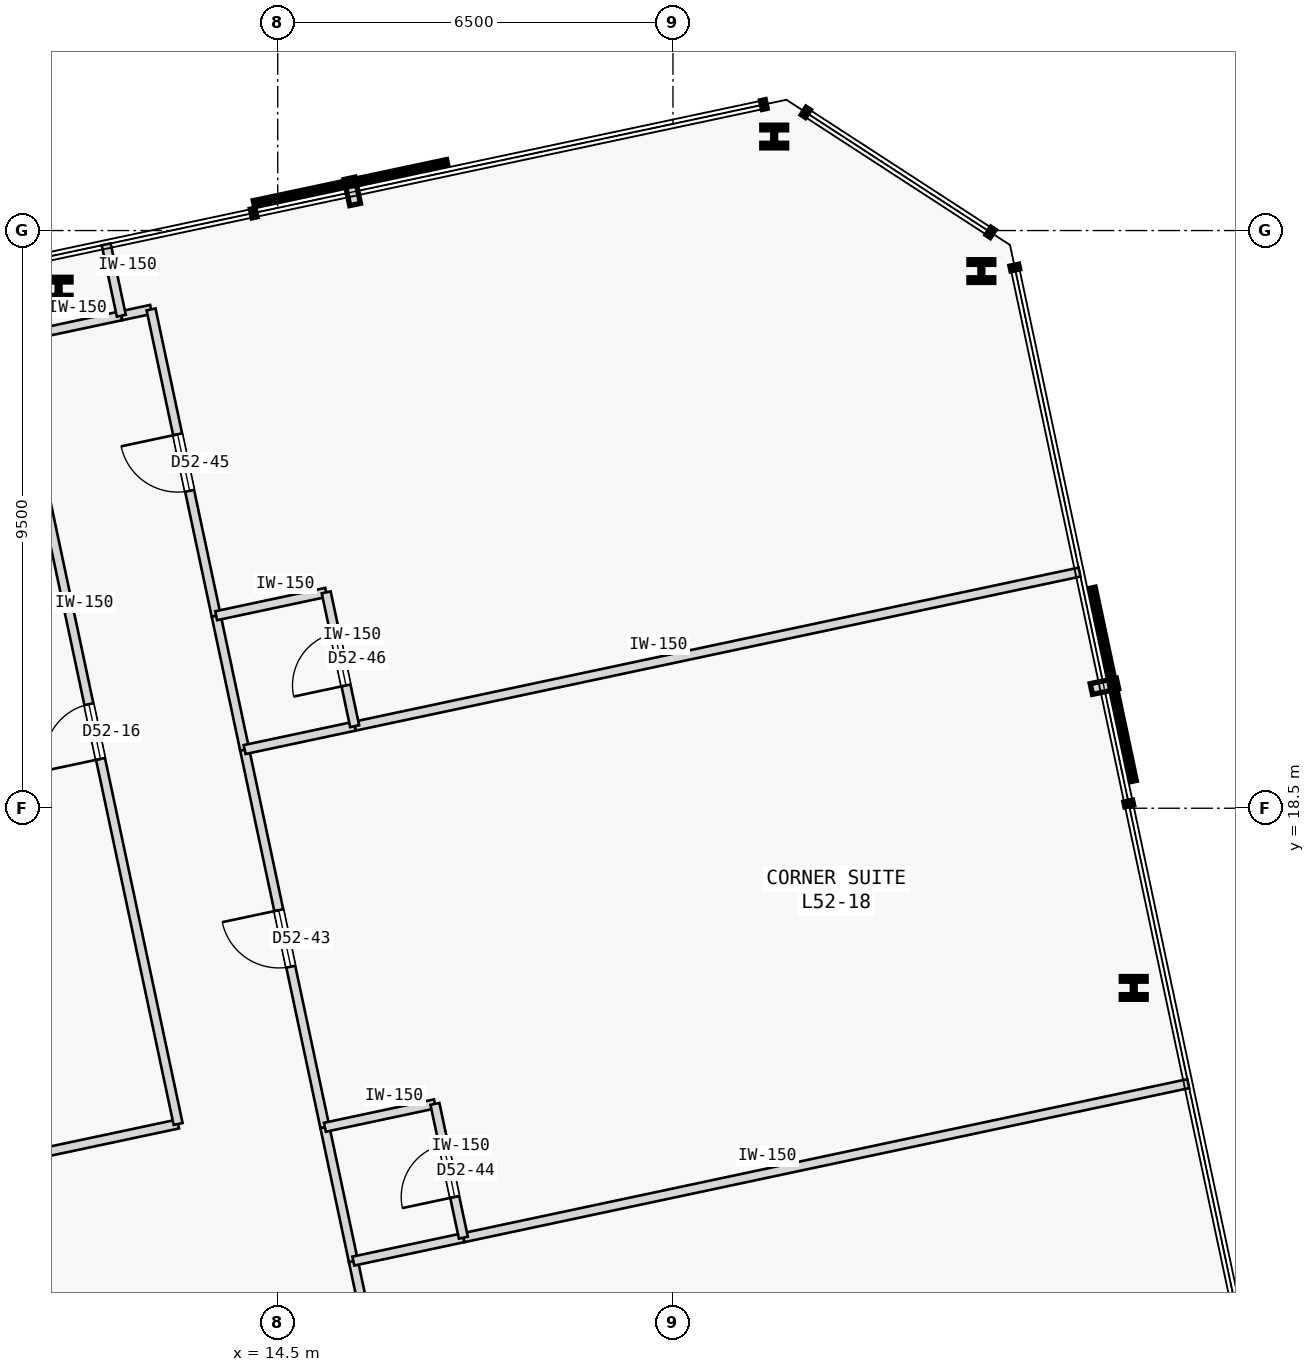
"""IFC4 building model, lengths in metres.
Left out: names, types, materials, properties, quantities, classifications, styles, units other than length and angle.
Written with IfcOpenShell. Run it as: python <this file> out.ifc"""

import sys

from ifc_helpers import new_model, si_unit, direction, frame, frame_2d, origin, origin_2d, place, context, subcontext, project, spatial, rectangle, i_section, extrude, element, fill, save


model = new_model("IFC4")
c1 = context("Model", 3, precision=1e-05, world=origin(), true_north=direction((0.0, 1.0)))
c2 = subcontext(c1, "Body", "Model", "MODEL_VIEW")
j1 = project(units=[si_unit("LENGTHUNIT", "METRE"), si_unit("PLANEANGLEUNIT", "RADIAN")], contexts=[c1])
p1 = place(None, origin())
s1 = spatial("IfcSite", under=j1, at=p1, CompositionType="ELEMENT")
p2 = place(p1, origin())
s2 = spatial("IfcBuilding", under=s1, at=p2, CompositionType="ELEMENT")
p3 = place(p2, frame((0.0, 0.0, 199.0)))
s3 = spatial("IfcBuildingStorey", under=s2, at=p3, CompositionType="ELEMENT", Elevation=199.0)
for number, where, z_axis, x_axis in (
    (1, (28.577, 15.545, 0.0), (0.0, 0.0, 1.0), (1.0, 0.0, 0.0)),
    (2, (26.071, 27.333, 0.0), (0.0, 0.0, 1.0), (1.0, 0.0, 0.0)),
    (3, (22.665, 29.546, 0.0), (0.0, 0.0, 1.0), (1.0, 0.0, 0.0)),
    (4, (10.896, 27.044, 0.0), (0.0, 0.0, 1.0), (1.0, 0.0, 0.0)),
):
    element("IfcColumn", number, at=place(p3, frame(where, z_axis=z_axis, x_axis=x_axis)), inside=s3, PredefinedType="COLUMN", context=c2, shape_type="SweptSolid", body=[
        extrude(i_section(OverallWidth=0.409, OverallDepth=0.374, WebThickness=0.048, FlangeThickness=0.077, FilletRadius=0.015, at=origin_2d()), origin(), (0.0, 0.0, 1.0), 3.4),
    ])
p4 = place(p3, frame((10.046, 12.709, 0.0), z_axis=(0.0, 0.0, 1.0), x_axis=(0.97816208355, 0.207843542851, 0.0)))
e5 = element("IfcWall", 5, at=p4, inside=s3, PredefinedType="PARTITIONING", context=c2, shape_type="SweptSolid", body=[
    extrude(rectangle(XDim=2.879, YDim=0.15, at=frame_2d((1.439, 0.0))), origin(), (0.0, 0.0, 1.0), 3.0),
])
p5 = place(p3, frame((12.862, 13.308, 0.0), z_axis=(0.0, 0.0, 1.0), x_axis=(-0.207911421929, 0.978147657888, 0.0)))
e6 = element("IfcWall", 6, at=p5, inside=s3, PredefinedType="PARTITIONING", context=c2, shape_type="SweptSolid", body=[
    extrude(rectangle(XDim=13.195, YDim=0.15, at=frame_2d((6.598, 0.0))), origin(), (0.0, 0.0, 1.0), 3.0),
])
p6 = place(p5, frame((6.137, 0.0, 0.0)))
e7 = element("IfcOpeningElement", 7, at=p6, cuts=e6, PredefinedType="OPENING", context=c2, shape_type="SweptSolid", body=[
    extrude(rectangle(XDim=0.92, YDim=2.15, at=frame_2d((0.46, 1.075))), frame((0.0, 0.085, 0.0), z_axis=(0.0, -1.0, 0.0), x_axis=(1.0, 0.0, 0.0)), (0.0, 0.0, 1.0), 0.17),
])
p7 = place(p3, frame((10.118, 26.214, 0.0), z_axis=(0.0, 0.0, 1.0), x_axis=(0.978133353907, 0.20797870558, 0.0)))
e8 = element("IfcWall", 8, at=p7, inside=s3, PredefinedType="PARTITIONING", context=c2, shape_type="SweptSolid", body=[
    extrude(rectangle(XDim=1.85, YDim=0.15, at=frame_2d((0.925, 0.0))), origin(), (0.0, 0.0, 1.0), 3.0),
])
p8 = place(p3, frame((17.064, 4.841, 0.0), z_axis=(0.0, 0.0, 1.0), x_axis=(-0.207924511115, 0.978144875608, 0.0)))
e9 = element("IfcWall", 9, at=p8, inside=s3, PredefinedType="PARTITIONING", context=c2, shape_type="SweptSolid", body=[
    extrude(rectangle(XDim=6.35, YDim=0.15, at=frame_2d((3.175, 0.0))), origin(), (0.0, 0.0, 1.0), 3.0),
])
p9 = place(p8, frame((2.7, 0.0, 0.0)))
e10 = element("IfcOpeningElement", 10, at=p9, cuts=e9, PredefinedType="OPENING", context=c2, shape_type="SweptSolid", body=[
    extrude(rectangle(XDim=0.95, YDim=2.15, at=frame_2d((0.475, 1.075))), frame((0.0, 0.085, 0.0), z_axis=(0.0, -1.0, 0.0), x_axis=(1.0, 0.0, 0.0)), (0.0, 0.0, 1.0), 0.17),
])
p10 = place(p3, frame((15.276, 13.253, 0.0), z_axis=(0.0, 0.0, 1.0), x_axis=(-0.207924511115, 0.978144875608, 0.0)))
e11 = element("IfcWall", 11, at=p10, inside=s3, PredefinedType="PARTITIONING", context=c2, shape_type="SweptSolid", body=[
    extrude(rectangle(XDim=6.35, YDim=0.15, at=frame_2d((3.175, 0.0))), origin(), (0.0, 0.0, 1.0), 3.0),
])
p11 = place(p10, frame((2.7, 0.0, 0.0)))
e12 = element("IfcOpeningElement", 12, at=p11, cuts=e11, PredefinedType="OPENING", context=c2, shape_type="SweptSolid", body=[
    extrude(rectangle(XDim=0.95, YDim=2.15, at=frame_2d((0.475, 1.075))), frame((0.0, 0.085, 0.0), z_axis=(0.0, -1.0, 0.0), x_axis=(1.0, 0.0, 0.0)), (0.0, 0.0, 1.0), 0.17),
])
p12 = place(p3, frame((15.744, 11.052, 0.0), z_axis=(0.0, 0.0, 1.0), x_axis=(-0.207891197838, 0.978151956427, 0.0)))
e13 = element("IfcWall", 13, at=p12, inside=s3, PredefinedType="PARTITIONING", context=c2, shape_type="SweptSolid", body=[
    extrude(rectangle(XDim=2.25, YDim=0.15, at=frame_2d((1.125, 0.0))), origin(), (0.0, 0.0, 1.0), 3.0),
])
p13 = place(p3, frame((11.928, 26.599, 0.0), z_axis=(0.0, 0.0, 1.0), x_axis=(0.97822210712, 0.207560856478, 0.0)))
e14 = element("IfcWall", 14, at=p13, inside=s3, PredefinedType="PARTITIONING", context=c2, shape_type="SweptSolid", body=[
    extrude(rectangle(XDim=0.5, YDim=0.15, at=frame_2d((0.25, 0.0))), origin(), (0.0, 0.0, 1.0), 3.0),
])
p14 = place(p3, frame((13.488, 21.666, 0.0), z_axis=(0.0, 0.0, 1.0), x_axis=(-0.207926226209, 0.978144511028, 0.0)))
e15 = element("IfcWall", 15, at=p14, inside=s3, PredefinedType="PARTITIONING", context=c2, shape_type="SweptSolid", body=[
    extrude(rectangle(XDim=5.15, YDim=0.15, at=frame_2d((2.575, 0.0))), origin(), (0.0, 0.0, 1.0), 3.0),
])
p15 = place(p14, frame((2.1, 0.0, 0.0)))
e16 = element("IfcOpeningElement", 16, at=p15, cuts=e15, PredefinedType="OPENING", context=c2, shape_type="SweptSolid", body=[
    extrude(rectangle(XDim=0.95, YDim=2.15, at=frame_2d((0.475, 1.075))), frame((0.0, 0.085, 0.0), z_axis=(0.0, -1.0, 0.0), x_axis=(1.0, 0.0, 0.0)), (0.0, 0.0, 1.0), 0.17),
])
p16 = place(p3, frame((13.956, 19.465, 0.0), z_axis=(0.0, 0.0, 1.0), x_axis=(-0.207891197838, 0.978151956427, 0.0)))
e17 = element("IfcWall", 17, at=p16, inside=s3, PredefinedType="PARTITIONING", context=c2, shape_type="SweptSolid", body=[
    extrude(rectangle(XDim=2.25, YDim=0.15, at=frame_2d((1.125, 0.0))), origin(), (0.0, 0.0, 1.0), 3.0),
])
p17 = place(p3, frame((11.928, 26.599, 0.0), z_axis=(0.0, 0.0, 1.0), x_axis=(-0.20795853359, 0.978137642823, 0.0)))
e18 = element("IfcWall", 18, at=p17, inside=s3, PredefinedType="PARTITIONING", context=c2, shape_type="SweptSolid", body=[
    extrude(rectangle(XDim=1.2, YDim=0.15, at=frame_2d((0.6, 0.0))), origin(), (0.0, 0.0, 1.0), 3.0),
])
p18 = place(p3, frame((17.553, 11.437, 0.0), z_axis=(0.0, 0.0, 1.0), x_axis=(0.97814556055, 0.207921288896, 0.0)))
e19 = element("IfcWall", 19, at=p18, inside=s3, PredefinedType="PARTITIONING", context=c2, shape_type="SweptSolid", body=[
    extrude(rectangle(XDim=12.187, YDim=0.15, at=frame_2d((6.094, 0.0))), origin(), (0.0, 0.0, 1.0), 3.0),
])
for number, where, z_axis, x_axis in (
    (20, (15.744, 11.052, 0.0), (0.0, 0.0, 1.0), (0.978, 0.208, 0.0)),
    (21, (15.276, 13.253, 0.0), (0.0, 0.0, 1.0), (0.978, 0.208, 0.0)),
):
    element("IfcWall", number, at=place(p3, frame(where, z_axis=z_axis, x_axis=x_axis)), inside=s3, PredefinedType="PARTITIONING", context=c2, shape_type="SweptSolid", body=[
        extrude(rectangle(XDim=1.85, YDim=0.15, at=frame_2d((0.925, 0.0))), origin(), (0.0, 0.0, 1.0), 3.0),
    ])
p19 = place(p3, frame((17.553, 11.437, 0.0), z_axis=(0.0, 0.0, 1.0), x_axis=(-0.207891197838, 0.978151956427, 0.0)))
e22 = element("IfcWall", 22, at=p19, inside=s3, PredefinedType="PARTITIONING", context=c2, shape_type="SweptSolid", body=[
    extrude(rectangle(XDim=2.25, YDim=0.15, at=frame_2d((1.125, 0.0))), origin(), (0.0, 0.0, 1.0), 3.0),
])
p20 = place(p19, frame((0.685, 0.0, 0.0)))
e23 = element("IfcOpeningElement", 23, at=p20, cuts=e22, PredefinedType="OPENING", context=c2, shape_type="SweptSolid", body=[
    extrude(rectangle(XDim=0.88, YDim=2.15, at=frame_2d((0.44, 1.075))), frame((0.0, 0.085, 0.0), z_axis=(0.0, -1.0, 0.0), x_axis=(1.0, 0.0, 0.0)), (0.0, 0.0, 1.0), 0.17),
])
p21 = place(p3, frame((15.765, 19.849, 0.0), z_axis=(0.0, 0.0, 1.0), x_axis=(0.978149634612, 0.207902121941, 0.0)))
e24 = element("IfcWall", 24, at=p21, inside=s3, PredefinedType="PARTITIONING", context=c2, shape_type="SweptSolid", body=[
    extrude(rectangle(XDim=12.187, YDim=0.15, at=frame_2d((6.094, 0.0))), origin(), (0.0, 0.0, 1.0), 3.0),
])
for number, where, z_axis, x_axis in (
    (25, (13.956, 19.465, 0.0), (0.0, 0.0, 1.0), (0.978, 0.208, 0.0)),
    (26, (13.488, 21.666, 0.0), (0.0, 0.0, 1.0), (0.978, 0.208, 0.0)),
):
    element("IfcWall", number, at=place(p3, frame(where, z_axis=z_axis, x_axis=x_axis)), inside=s3, PredefinedType="PARTITIONING", context=c2, shape_type="SweptSolid", body=[
        extrude(rectangle(XDim=1.85, YDim=0.15, at=frame_2d((0.925, 0.0))), origin(), (0.0, 0.0, 1.0), 3.0),
    ])
p22 = place(p3, frame((15.765, 19.849, 0.0), z_axis=(0.0, 0.0, 1.0), x_axis=(-0.207891197838, 0.978151956427, 0.0)))
e27 = element("IfcWall", 27, at=p22, inside=s3, PredefinedType="PARTITIONING", context=c2, shape_type="SweptSolid", body=[
    extrude(rectangle(XDim=2.25, YDim=0.15, at=frame_2d((1.125, 0.0))), origin(), (0.0, 0.0, 1.0), 3.0),
])
p23 = place(p22, frame((0.685, 0.0, 0.0)))
e28 = element("IfcOpeningElement", 28, at=p23, cuts=e27, PredefinedType="OPENING", context=c2, shape_type="SweptSolid", body=[
    extrude(rectangle(XDim=0.88, YDim=2.15, at=frame_2d((0.44, 1.075))), frame((0.0, 0.085, 0.0), z_axis=(0.0, -1.0, 0.0), x_axis=(1.0, 0.0, 0.0)), (0.0, 0.0, 1.0), 0.17),
])
p24 = place(p6, origin())
e29 = element("IfcDoor", 29, at=p24, inside=s3, OperationType="SINGLE_SWING_LEFT", PredefinedType="DOOR", context=c2, shape_type="SweptSolid", body=[
    extrude(rectangle(XDim=0.92, YDim=2.15, at=frame_2d((0.46, 1.075))), frame((0.0, 0.025, 0.0), z_axis=(0.0, -1.0, 0.0), x_axis=(1.0, 0.0, 0.0)), (0.0, 0.0, 1.0), 0.05),
])
fill(e7, e29)
p25 = place(p11, origin())
e30 = element("IfcDoor", 30, at=p25, inside=s3, OperationType="SINGLE_SWING_RIGHT", PredefinedType="DOOR", context=c2, shape_type="SweptSolid", body=[
    extrude(rectangle(XDim=0.95, YDim=2.15, at=frame_2d((0.475, 1.075))), frame((0.0, 0.025, 0.0), z_axis=(0.0, -1.0, 0.0), x_axis=(1.0, 0.0, 0.0)), (0.0, 0.0, 1.0), 0.05),
])
fill(e12, e30)
p26 = place(p20, origin())
e31 = element("IfcDoor", 31, at=p26, inside=s3, OperationType="SINGLE_SWING_LEFT", PredefinedType="DOOR", context=c2, shape_type="SweptSolid", body=[
    extrude(rectangle(XDim=0.88, YDim=2.15, at=frame_2d((0.44, 1.075))), frame((0.0, 0.025, 0.0), z_axis=(0.0, -1.0, 0.0), x_axis=(1.0, 0.0, 0.0)), (0.0, 0.0, 1.0), 0.05),
])
fill(e23, e31)
p27 = place(p15, origin())
e32 = element("IfcDoor", 32, at=p27, inside=s3, OperationType="SINGLE_SWING_RIGHT", PredefinedType="DOOR", context=c2, shape_type="SweptSolid", body=[
    extrude(rectangle(XDim=0.95, YDim=2.15, at=frame_2d((0.475, 1.075))), frame((0.0, 0.025, 0.0), z_axis=(0.0, -1.0, 0.0), x_axis=(1.0, 0.0, 0.0)), (0.0, 0.0, 1.0), 0.05),
])
fill(e16, e32)
p28 = place(p23, origin())
e33 = element("IfcDoor", 33, at=p28, inside=s3, OperationType="SINGLE_SWING_LEFT", PredefinedType="DOOR", context=c2, shape_type="SweptSolid", body=[
    extrude(rectangle(XDim=0.88, YDim=2.15, at=frame_2d((0.44, 1.075))), frame((0.0, 0.025, 0.0), z_axis=(0.0, -1.0, 0.0), x_axis=(1.0, 0.0, 0.0)), (0.0, 0.0, 1.0), 0.05),
])
fill(e28, e33)
save(model, sys.argv[1])
